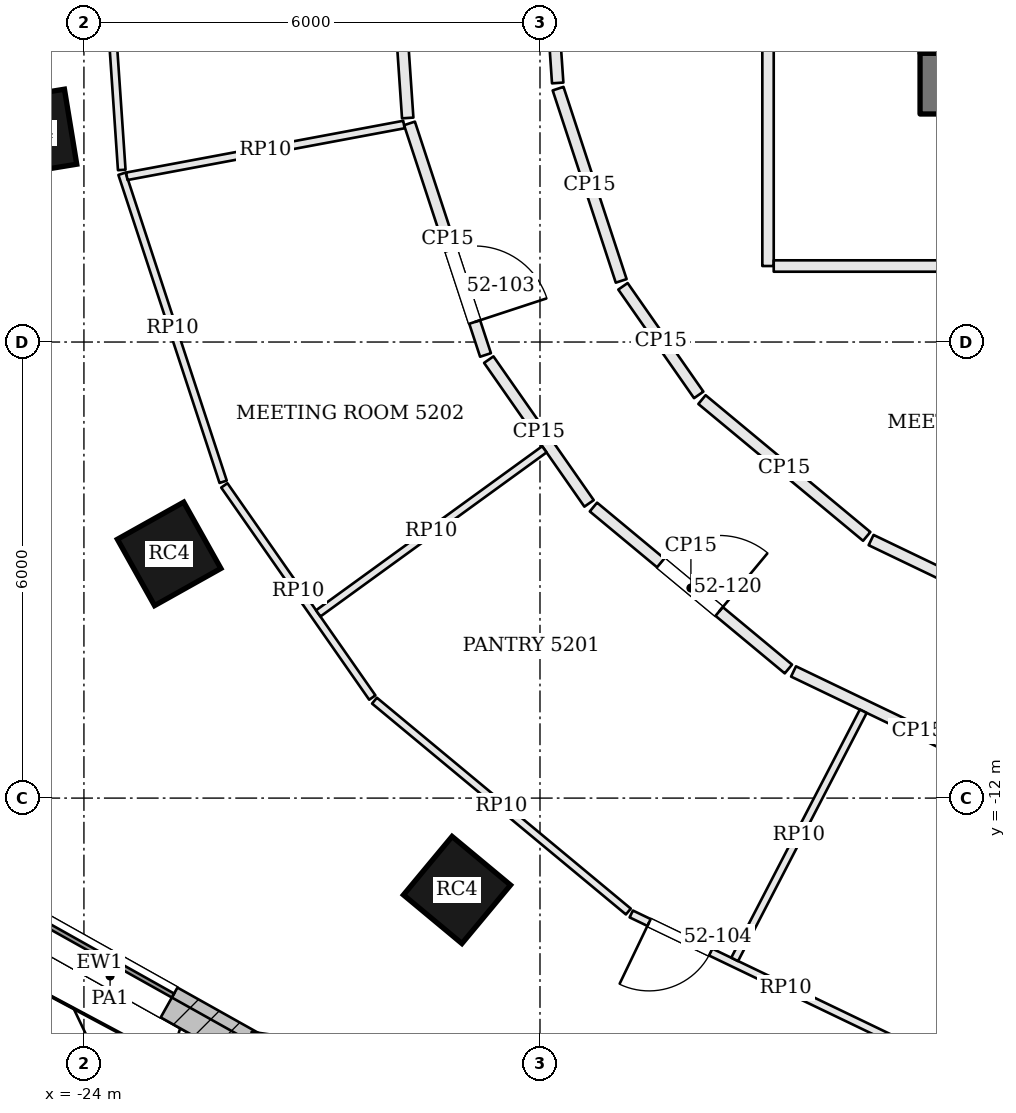
"""IFC4 building model, lengths in metres.
Left out: names, types, materials, properties, quantities, classifications, styles, units other than length and angle.
Written with IfcOpenShell. Run it as: python <this file> out.ifc"""

import sys

from ifc_helpers import new_model, si_unit, direction, frame, frame_2d, origin, origin_2d, place, context, subcontext, project, spatial, rectangle, extrude, element, fill, save


model = new_model("IFC4")
c1 = context("Model", 3, precision=1e-05, world=origin(), true_north=direction((0.0, 1.0)))
c2 = subcontext(c1, "Body", "Model", "MODEL_VIEW")
j1 = project(units=[si_unit("LENGTHUNIT", "METRE"), si_unit("PLANEANGLEUNIT", "RADIAN")], contexts=[c1])
p1 = place(None, origin())
s1 = spatial("IfcSite", under=j1, at=p1, CompositionType="ELEMENT")
p2 = place(p1, origin())
s2 = spatial("IfcBuilding", under=s1, at=p2, CompositionType="ELEMENT")
p3 = place(p2, frame((0.0, 0.0, 213.0)))
s3 = spatial("IfcBuildingStorey", under=s2, at=p3, CompositionType="ELEMENT", Elevation=213.0)
p4 = place(p3, frame((-13.0, -2.6, 0.0), z_axis=(0.0, 0.0, 1.0), x_axis=(1.0, 0.0, 0.0)))
e1 = element("IfcWall", 1, at=p4, inside=s3, PredefinedType="SHEAR", context=c2, shape_type="SweptSolid", body=[
    extrude(rectangle(XDim=26.0, YDim=0.8, at=frame_2d((13.0, 0.0))), origin(), (0.0, 0.0, 1.0), 3.9),
])
p5 = place(p4, frame((8.925, 0.0, 0.0)))
e2 = element("IfcOpeningElement", 2, at=p5, cuts=e1, PredefinedType="OPENING", context=c2, shape_type="SweptSolid", body=[
    extrude(rectangle(XDim=0.9, YDim=2.1, at=frame_2d((0.45, 1.05))), frame((0.0, 0.41, 0.0), z_axis=(0.0, -1.0, 0.0), x_axis=(1.0, 0.0, 0.0)), (0.0, 0.0, 1.0), 0.82),
])
p6 = place(p4, frame((11.475, 0.0, 0.0)))
e3 = element("IfcOpeningElement", 3, at=p6, cuts=e1, PredefinedType="OPENING", context=c2, shape_type="SweptSolid", body=[
    extrude(rectangle(XDim=0.9, YDim=2.1, at=frame_2d((0.45, 1.05))), frame((0.0, 0.41, 0.0), z_axis=(0.0, -1.0, 0.0), x_axis=(1.0, 0.0, 0.0)), (0.0, 0.0, 1.0), 0.82),
])
p7 = place(p4, frame((13.6, 0.0, 0.0)))
e4 = element("IfcOpeningElement", 4, at=p7, cuts=e1, PredefinedType="OPENING", context=c2, shape_type="SweptSolid", body=[
    extrude(rectangle(XDim=1.0, YDim=2.1, at=frame_2d((0.5, 1.05))), frame((0.0, 0.41, 0.0), z_axis=(0.0, -1.0, 0.0), x_axis=(1.0, 0.0, 0.0)), (0.0, 0.0, 1.0), 0.82),
])
p8 = place(p4, frame((15.95, 0.0, 0.0)))
e5 = element("IfcOpeningElement", 5, at=p8, cuts=e1, PredefinedType="OPENING", context=c2, shape_type="SweptSolid", body=[
    extrude(rectangle(XDim=1.0, YDim=2.1, at=frame_2d((0.5, 1.05))), frame((0.0, 0.41, 0.0), z_axis=(0.0, -1.0, 0.0), x_axis=(1.0, 0.0, 0.0)), (0.0, 0.0, 1.0), 0.82),
])
p9 = place(p3, frame((-12.6, -2.2, 0.0), z_axis=(0.0, 0.0, 1.0), x_axis=(0.0, 1.0, 0.0)))
e6 = element("IfcWall", 6, at=p9, inside=s3, PredefinedType="SHEAR", context=c2, shape_type="SweptSolid", body=[
    extrude(rectangle(XDim=13.4, YDim=0.8, at=frame_2d((6.7, 0.0))), origin(), (0.0, 0.0, 1.0), 3.9),
])
p10 = place(p9, frame((4.2, 0.0, 0.0)))
e7 = element("IfcOpeningElement", 7, at=p10, cuts=e6, PredefinedType="OPENING", context=c2, shape_type="SweptSolid", body=[
    extrude(rectangle(XDim=1.8, YDim=2.1, at=frame_2d((0.9, 1.05))), frame((0.0, 0.41, 0.0), z_axis=(0.0, -1.0, 0.0), x_axis=(1.0, 0.0, 0.0)), (0.0, 0.0, 1.0), 0.82),
])
for number, where, z_axis, x_axis in (
    (8, (-24.669, -3.248, 0.0), (0.0, 0.0, 1.0), (0.162, -0.987, 0.0)),
    (9, (-22.879, -8.787, 0.0), (0.0, 0.0, 1.0), (0.489, -0.873, 0.0)),
    (10, (-19.092, -13.209, 0.0), (0.0, 0.0, 1.0), (0.769, -0.639, 0.0)),
):
    element("IfcColumn", number, at=place(p3, frame(where, z_axis=z_axis, x_axis=x_axis)), inside=s3, PredefinedType="COLUMN", context=c2, shape_type="SweptSolid", body=[
        extrude(rectangle(XDim=1.0, YDim=1.0, at=origin_2d()), origin(), (0.0, 0.0, 1.0), 3.9),
    ])
p11 = place(p3, frame((-25.844, -13.028, 0.0), z_axis=(0.0, 0.0, 1.0), x_axis=(0.872346398261, -0.488888291373, 0.0)))
e11 = element("IfcWall", 11, at=p11, inside=s3, PredefinedType="SOLIDWALL", context=c2, shape_type="SweptSolid", body=[
    extrude(rectangle(XDim=4.696, YDim=0.45, at=frame_2d((2.348, 0.0))), origin(), (0.0, 0.0, 1.0), 3.6),
])
p12 = place(p11, frame((1.298, 0.0, 0.9)))
e12 = element("IfcOpeningElement", 12, at=p12, cuts=e11, PredefinedType="OPENING", context=c2, shape_type="SweptSolid", body=[
    extrude(rectangle(XDim=2.1, YDim=1.8, at=frame_2d((1.05, 0.9))), frame((0.0, 0.235, 0.0), z_axis=(0.0, -1.0, 0.0), x_axis=(1.0, 0.0, 0.0)), (0.0, 0.0, 1.0), 0.47),
])
p13 = place(p3, frame((-21.825, -15.297, 0.0), z_axis=(0.0, 0.0, 1.0), x_axis=(0.98971474215, -0.143054986527, 0.0)))
e13 = element("IfcWall", 13, at=p13, inside=s3, PredefinedType="SOLIDWALL", context=c2, shape_type="SweptSolid", body=[
    extrude(rectangle(XDim=5.753, YDim=0.45, at=frame_2d((2.876, 0.0))), origin(), (0.0, 0.0, 1.0), 3.6),
])
p14 = place(p13, frame((1.826, 0.0, 0.9)))
e14 = element("IfcOpeningElement", 14, at=p14, cuts=e13, PredefinedType="OPENING", context=c2, shape_type="SweptSolid", body=[
    extrude(rectangle(XDim=2.1, YDim=1.8, at=frame_2d((1.05, 0.9))), frame((0.0, 0.235, 0.0), z_axis=(0.0, -1.0, 0.0), x_axis=(1.0, 0.0, 0.0)), (0.0, 0.0, 1.0), 0.47),
])
p15 = place(p3, frame((-25.734, -13.176, 3.9), z_axis=(0.0, 0.0, 1.0), x_axis=(0.872345142407, -0.488890532245, 0.0)))
e15 = element("IfcWall", 15, at=p15, inside=s3, PredefinedType="PARAPET", context=c2, shape_type="SweptSolid", body=[
    extrude(rectangle(XDim=4.763, YDim=0.3, at=frame_2d((2.381, 0.0))), origin(), (0.0, 0.0, 1.0), 1.1),
])
p16 = place(p3, frame((-19.944, -0.075, 0.0), z_axis=(0.0, 0.0, 1.0), x_axis=(0.068136763128, -0.997675990245, 0.0)))
e16 = element("IfcWall", 16, at=p16, inside=s3, PredefinedType="PARTITIONING", context=c2, shape_type="SweptSolid", body=[
    extrude(rectangle(XDim=2.985, YDim=0.15, at=frame_2d((1.492, 0.0))), origin(), (0.0, 0.0, 1.0), 2.984),
])
p17 = place(p3, frame((-19.717, -3.124, 0.0), z_axis=(0.0, 0.0, 1.0), x_axis=(0.31188427026, -0.950120098706, 0.0)))
e17 = element("IfcWall", 17, at=p17, inside=s3, PredefinedType="PARTITIONING", context=c2, shape_type="SweptSolid", body=[
    extrude(rectangle(XDim=3.206, YDim=0.15, at=frame_2d((1.603, 0.0))), origin(), (0.0, 0.0, 1.0), 2.984),
])
p18 = place(p17, frame((1.75, 0.0, 0.0)))
e18 = element("IfcOpeningElement", 18, at=p18, cuts=e17, PredefinedType="OPENING", context=c2, shape_type="SweptSolid", body=[
    extrude(rectangle(XDim=1.0, YDim=2.4, at=frame_2d((0.5, 1.2))), frame((0.0, 0.085, 0.0), z_axis=(0.0, -1.0, 0.0), x_axis=(1.0, 0.0, 0.0)), (0.0, 0.0, 1.0), 0.17),
])
p19 = place(p3, frame((-18.674, -6.232, 0.0), z_axis=(0.0, 0.0, 1.0), x_axis=(0.572118665737, -0.820170855563, 0.0)))
e19 = element("IfcWall", 19, at=p19, inside=s3, PredefinedType="PARTITIONING", context=c2, shape_type="SweptSolid", body=[
    extrude(rectangle(XDim=2.306, YDim=0.15, at=frame_2d((1.153, 0.0))), origin(), (0.0, 0.0, 1.0), 2.984),
])
p20 = place(p3, frame((-17.297, -8.171, 0.0), z_axis=(0.0, 0.0, 1.0), x_axis=(0.769228575061, -0.638973707839, 0.0)))
e20 = element("IfcWall", 20, at=p20, inside=s3, PredefinedType="PARTITIONING", context=c2, shape_type="SweptSolid", body=[
    extrude(rectangle(XDim=3.334, YDim=0.15, at=frame_2d((1.667, 0.0))), origin(), (0.0, 0.0, 1.0), 2.984),
])
p21 = place(p20, frame((1.15, 0.0, 0.0)))
e21 = element("IfcOpeningElement", 21, at=p21, cuts=e20, PredefinedType="OPENING", context=c2, shape_type="SweptSolid", body=[
    extrude(rectangle(XDim=1.0, YDim=2.1, at=frame_2d((0.5, 1.05))), frame((0.0, 0.085, 0.0), z_axis=(0.0, -1.0, 0.0), x_axis=(1.0, 0.0, 0.0)), (0.0, 0.0, 1.0), 0.17),
])
p22 = place(p3, frame((-14.664, -10.334, 0.0), z_axis=(0.0, 0.0, 1.0), x_axis=(0.901507315282, -0.432763862278, 0.0)))
e22 = element("IfcWall", 22, at=p22, inside=s3, PredefinedType="PARTITIONING", context=c2, shape_type="SweptSolid", body=[
    extrude(rectangle(XDim=3.63, YDim=0.15, at=frame_2d((1.815, 0.0))), origin(), (0.0, 0.0, 1.0), 2.984),
])
p23 = place(p3, frame((-10.776, -9.982, 0.0), z_axis=(0.0, 0.0, 1.0), x_axis=(-0.901511079436, 0.432756020933, 0.0)))
e23 = element("IfcWall", 23, at=p23, inside=s3, PredefinedType="PARTITIONING", context=c2, shape_type="SweptSolid", body=[
    extrude(rectangle(XDim=3.181, YDim=0.15, at=frame_2d((1.59, 0.0))), origin(), (0.0, 0.0, 1.0), 2.984),
])
p24 = place(p3, frame((-13.702, -8.557, 0.0), z_axis=(0.0, 0.0, 1.0), x_axis=(-0.769221825067, 0.638981833733, 0.0)))
e24 = element("IfcWall", 24, at=p24, inside=s3, PredefinedType="PARTITIONING", context=c2, shape_type="SweptSolid", body=[
    extrude(rectangle(XDim=2.817, YDim=0.15, at=frame_2d((1.409, 0.0))), origin(), (0.0, 0.0, 1.0), 2.984),
])
p25 = place(p3, frame((-15.912, -6.696, 0.0), z_axis=(0.0, 0.0, 1.0), x_axis=(-0.572078533763, 0.820198848578, 0.0)))
e25 = element("IfcWall", 25, at=p25, inside=s3, PredefinedType="PARTITIONING", context=c2, shape_type="SweptSolid", body=[
    extrude(rectangle(XDim=1.742, YDim=0.15, at=frame_2d((0.871, 0.0))), origin(), (0.0, 0.0, 1.0), 2.984),
])
p26 = place(p3, frame((-16.932, -5.196, 0.0), z_axis=(0.0, 0.0, 1.0), x_axis=(-0.311904957484, 0.950113307715, 0.0)))
e26 = element("IfcWall", 26, at=p26, inside=s3, PredefinedType="PARTITIONING", context=c2, shape_type="SweptSolid", body=[
    extrude(rectangle(XDim=2.662, YDim=0.15, at=frame_2d((1.331, 0.0))), origin(), (0.0, 0.0, 1.0), 2.984),
])
p27 = place(p3, frame((-17.767, -2.592, 0.0), z_axis=(0.0, 0.0, 1.0), x_axis=(-0.068140828228, 0.997675712608, 0.0)))
e27 = element("IfcWall", 27, at=p27, inside=s3, PredefinedType="PARTITIONING", context=c2, shape_type="SweptSolid", body=[
    extrude(rectangle(XDim=2.598, YDim=0.15, at=frame_2d((1.299, 0.0))), origin(), (0.0, 0.0, 1.0), 2.984),
])
p28 = place(p3, frame((-15.0, 7.423, 0.0), z_axis=(0.0, 0.0, 1.0), x_axis=(0.0, -1.0, 0.0)))
e28 = element("IfcWall", 28, at=p28, inside=s3, PredefinedType="PARTITIONING", context=c2, shape_type="SweptSolid", body=[
    extrude(rectangle(XDim=12.423, YDim=0.15, at=frame_2d((6.211, 0.0))), origin(), (0.0, 0.0, 1.0), 2.984),
])
p29 = place(p28, frame((5.674, 0.0, 0.0)))
e29 = element("IfcOpeningElement", 29, at=p29, cuts=e28, PredefinedType="OPENING", context=c2, shape_type="SweptSolid", body=[
    extrude(rectangle(XDim=1.0, YDim=2.4, at=frame_2d((0.5, 1.2))), frame((0.0, 0.085, 0.0), z_axis=(0.0, -1.0, 0.0), x_axis=(1.0, 0.0, 0.0)), (0.0, 0.0, 1.0), 0.17),
])
p30 = place(p3, frame((-14.925, -5.0, 0.0), z_axis=(0.0, 0.0, 1.0), x_axis=(1.0, 0.0, 0.0)))
e30 = element("IfcWall", 30, at=p30, inside=s3, PredefinedType="PARTITIONING", context=c2, shape_type="SweptSolid", body=[
    extrude(rectangle(XDim=29.925, YDim=0.15, at=frame_2d((14.962, 0.0))), origin(), (0.0, 0.0, 1.0), 2.984),
])
p31 = place(p30, frame((14.025, 0.0, 0.0)))
e31 = element("IfcOpeningElement", 31, at=p31, cuts=e30, PredefinedType="OPENING", context=c2, shape_type="SweptSolid", body=[
    extrude(rectangle(XDim=1.8, YDim=2.1, at=frame_2d((0.9, 1.05))), frame((0.0, 0.085, 0.0), z_axis=(0.0, -1.0, 0.0), x_axis=(1.0, 0.0, 0.0)), (0.0, 0.0, 1.0), 0.17),
])
p32 = place(p3, frame((-12.734, -15.476, 0.0), z_axis=(0.0, 0.0, 1.0), x_axis=(-0.901501091464, 0.432776827117, 0.0)))
e32 = element("IfcWall", 32, at=p32, inside=s3, PredefinedType="PARTITIONING", context=c2, shape_type="SweptSolid", body=[
    extrude(rectangle(XDim=4.51, YDim=0.1, at=frame_2d((2.255, 0.0))), origin(), (0.0, 0.0, 1.0), 2.984),
])
p33 = place(p32, frame((3.35, 0.0, 0.0)))
e33 = element("IfcOpeningElement", 33, at=p33, cuts=e32, PredefinedType="OPENING", context=c2, shape_type="SweptSolid", body=[
    extrude(rectangle(XDim=0.9, YDim=2.1, at=frame_2d((0.45, 1.05))), frame((0.0, 0.06, 0.0), z_axis=(0.0, -1.0, 0.0), x_axis=(1.0, 0.0, 0.0)), (0.0, 0.0, 1.0), 0.12),
])
p34 = place(p3, frame((-16.838, -13.492, 0.0), z_axis=(0.0, 0.0, 1.0), x_axis=(-0.769220564036, 0.63898335179, 0.0)))
e34 = element("IfcWall", 34, at=p34, inside=s3, PredefinedType="PARTITIONING", context=c2, shape_type="SweptSolid", body=[
    extrude(rectangle(XDim=4.342, YDim=0.1, at=frame_2d((2.171, 0.0))), origin(), (0.0, 0.0, 1.0), 2.984),
])
p35 = place(p3, frame((-20.206, -10.677, 0.0), z_axis=(0.0, 0.0, 1.0), x_axis=(-0.572094058211, 0.820188020249, 0.0)))
e35 = element("IfcWall", 35, at=p35, inside=s3, PredefinedType="PARTITIONING", context=c2, shape_type="SweptSolid", body=[
    extrude(rectangle(XDim=3.403, YDim=0.1, at=frame_2d((1.701, 0.0))), origin(), (0.0, 0.0, 1.0), 2.984),
])
p36 = place(p3, frame((-22.169, -7.839, 0.0), z_axis=(0.0, 0.0, 1.0), x_axis=(-0.311880220566, 0.95012142804, 0.0)))
e36 = element("IfcWall", 36, at=p36, inside=s3, PredefinedType="PARTITIONING", context=c2, shape_type="SweptSolid", body=[
    extrude(rectangle(XDim=4.265, YDim=0.1, at=frame_2d((2.133, 0.0))), origin(), (0.0, 0.0, 1.0), 2.984),
])
p37 = place(p3, frame((-23.502, -3.736, 0.0), z_axis=(0.0, 0.0, 1.0), x_axis=(-0.068197929309, 0.997671810987, 0.0)))
e37 = element("IfcWall", 37, at=p37, inside=s3, PredefinedType="PARTITIONING", context=c2, shape_type="SweptSolid", body=[
    extrude(rectangle(XDim=3.745, YDim=0.1, at=frame_2d((1.872, 0.0))), origin(), (0.0, 0.0, 1.0), 2.984),
])
p38 = place(p3, frame((-19.79, -3.139, 0.0), z_axis=(0.0, 0.0, 1.0), x_axis=(-0.983000134823, -0.183604833647, 0.0)))
e38 = element("IfcWall", 38, at=p38, inside=s3, PredefinedType="PARTITIONING", context=c2, shape_type="SweptSolid", body=[
    extrude(rectangle(XDim=3.708, YDim=0.1, at=frame_2d((1.854, 0.0))), origin(), (0.0, 0.0, 1.0), 2.984),
])
p39 = place(p3, frame((-17.942, -7.412, 0.0), z_axis=(0.0, 0.0, 1.0), x_axis=(-0.809416276525, -0.587235294662, 0.0)))
e39 = element("IfcWall", 39, at=p39, inside=s3, PredefinedType="PARTITIONING", context=c2, shape_type="SweptSolid", body=[
    extrude(rectangle(XDim=3.676, YDim=0.1, at=frame_2d((1.838, 0.0))), origin(), (0.0, 0.0, 1.0), 2.984),
])
p40 = place(p3, frame((-13.747, -10.857, 0.0), z_axis=(0.0, 0.0, 1.0), x_axis=(-0.460154350261, -0.887838934681, 0.0)))
e40 = element("IfcWall", 40, at=p40, inside=s3, PredefinedType="PARTITIONING", context=c2, shape_type="SweptSolid", body=[
    extrude(rectangle(XDim=3.677, YDim=0.1, at=frame_2d((1.838, 0.0))), origin(), (0.0, 0.0, 1.0), 2.984),
])
p41 = place(p12, origin())
e41 = element("IfcWindow", 41, at=p41, inside=s3, PartitioningType="SINGLE_PANEL", PredefinedType="WINDOW", context=c2, shape_type="SweptSolid", body=[
    extrude(rectangle(XDim=2.1, YDim=1.8, at=frame_2d((1.05, 0.9))), frame((0.0, 0.135, 0.0), z_axis=(0.0, -1.0, 0.0), x_axis=(1.0, 0.0, 0.0)), (0.0, 0.0, 1.0), 0.06),
])
fill(e12, e41)
p42 = place(p18, origin())
e42 = element("IfcDoor", 42, at=p42, inside=s3, OperationType="SINGLE_SWING_RIGHT", PredefinedType="DOOR", context=c2, shape_type="SweptSolid", body=[
    extrude(rectangle(XDim=1.0, YDim=2.4, at=frame_2d((0.5, 1.2))), frame((0.0, 0.025, 0.0), z_axis=(0.0, -1.0, 0.0), x_axis=(1.0, 0.0, 0.0)), (0.0, 0.0, 1.0), 0.05),
])
fill(e18, e42)
p43 = place(p33, origin())
e43 = element("IfcDoor", 43, at=p43, inside=s3, OperationType="SINGLE_SWING_RIGHT", PredefinedType="DOOR", context=c2, shape_type="SweptSolid", body=[
    extrude(rectangle(XDim=0.9, YDim=2.1, at=frame_2d((0.45, 1.05))), frame((0.0, 0.025, 0.0), z_axis=(0.0, -1.0, 0.0), x_axis=(1.0, 0.0, 0.0)), (0.0, 0.0, 1.0), 0.05),
])
fill(e33, e43)
p44 = place(p21, origin())
e44 = element("IfcDoor", 44, at=p44, inside=s3, OperationType="SINGLE_SWING_RIGHT", PredefinedType="DOOR", context=c2, shape_type="SweptSolid", body=[
    extrude(rectangle(XDim=1.0, YDim=2.1, at=frame_2d((0.5, 1.05))), frame((0.0, 0.025, 0.0), z_axis=(0.0, -1.0, 0.0), x_axis=(1.0, 0.0, 0.0)), (0.0, 0.0, 1.0), 0.05),
])
fill(e21, e44)
save(model, sys.argv[1])
